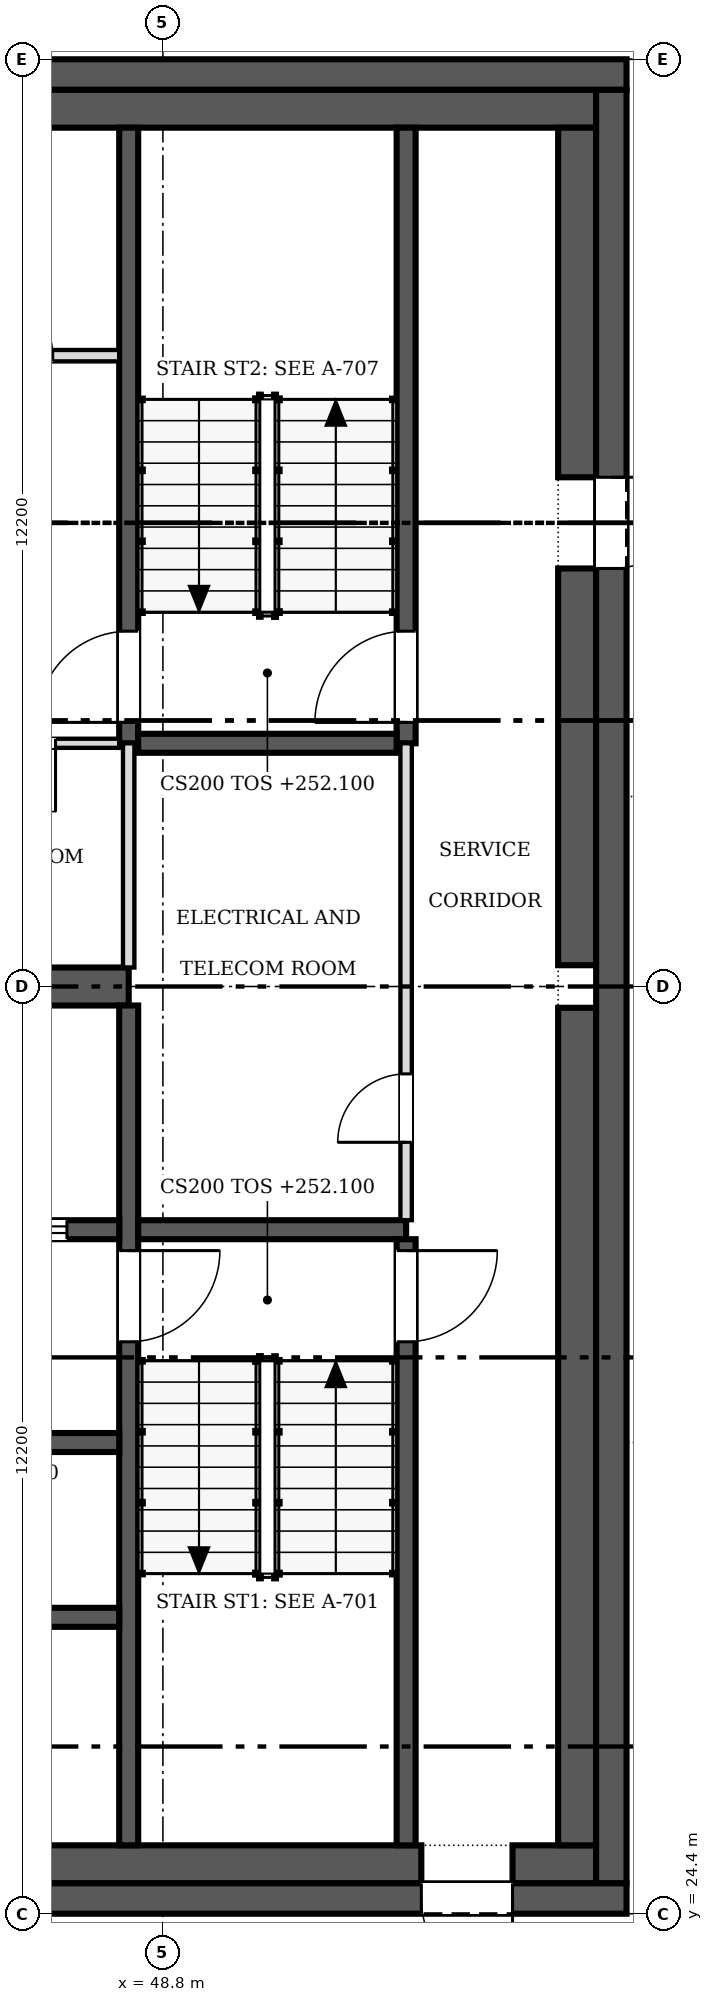
"""IFC4 building model, lengths in metres.
Left out: names, types, materials, properties, quantities, classifications, styles, units other than length and angle.
Written with IfcOpenShell. Run it as: python <this file> out.ifc"""

import sys

from ifc_helpers import new_model, si_unit, direction, frame, frame_2d, origin, place, context, subcontext, project, spatial, rectangle, extrude, source, transform, mapped, element, fill, save


model = new_model("IFC4")
c1 = context("Model", 3, precision=1e-05, world=origin(), true_north=direction((0.0, 1.0)))
c2 = subcontext(c1, "Body", "Model", "MODEL_VIEW")
j1 = project(units=[si_unit("LENGTHUNIT", "METRE"), si_unit("PLANEANGLEUNIT", "RADIAN")], contexts=[c1])
p1 = place(None, origin())
s1 = spatial("IfcSite", under=j1, at=p1, CompositionType="ELEMENT")
p2 = place(p1, origin())
s2 = spatial("IfcBuilding", under=s1, at=p2, CompositionType="ELEMENT")
p3 = place(p2, frame((0.0, 0.0, 252.1)))
s3 = spatial("IfcBuildingStorey", under=s2, at=p3, CompositionType="ELEMENT", Elevation=252.1)
p4 = place(p3, frame((54.9, 24.6, 0.0), z_axis=(0.0, 0.0, 1.0), x_axis=(-1.0, 0.0, 0.0)))
e1 = element("IfcWall", 1, at=p4, inside=s3, PredefinedType="SHEAR", context=c2, shape_type="SweptSolid", body=[
    extrude(rectangle(XDim=24.4, YDim=0.4, at=frame_2d((12.2, 0.0))), origin(), (0.0, 0.0, 1.0), 3.8),
])
m1 = source(origin(), c2, "Body", "SweptSolid", [
    extrude(rectangle(XDim=1.2, YDim=2.1, at=frame_2d((0.6, 1.05))), frame((0.0, 0.21, 0.0), z_axis=(0.0, -1.0, 0.0), x_axis=(1.0, 0.0, 0.0)), (0.0, 0.0, 1.0), 0.42),
])
p5 = place(p4, frame((1.5, 0.0, 0.0)))
e2 = element("IfcOpeningElement", 2, at=p5, cuts=e1, PredefinedType="OPENING", context=c2, shape_type="MappedRepresentation", body=[
    mapped(m1, transform((0.0, 0.0, 0.0), scale=1.0)),
])
p6 = place(p3, frame((30.5, 48.6, 0.0), z_axis=(0.0, 0.0, 1.0), x_axis=(1.0, 0.0, 0.0)))
e3 = element("IfcWall", 3, at=p6, inside=s3, PredefinedType="SHEAR", context=c2, shape_type="SweptSolid", body=[
    extrude(rectangle(XDim=24.4, YDim=0.4, at=frame_2d((12.2, 0.0))), origin(), (0.0, 0.0, 1.0), 3.8),
])
p7 = place(p3, frame((54.7, 48.4, 0.0), z_axis=(0.0, 0.0, 1.0), x_axis=(0.0, -1.0, 0.0)))
e4 = element("IfcWall", 4, at=p7, inside=s3, PredefinedType="SHEAR", context=c2, shape_type="SweptSolid", body=[
    extrude(rectangle(XDim=23.6, YDim=0.4, at=frame_2d((11.8, 0.0))), origin(), (0.0, 0.0, 1.0), 3.8),
])
p8 = place(p7, frame((5.1, 0.0, 0.0)))
e5 = element("IfcOpeningElement", 5, at=p8, cuts=e4, PredefinedType="OPENING", context=c2, shape_type="MappedRepresentation", body=[
    mapped(m1, transform((0.0, 0.0, 0.0), scale=1.0)),
])
p9 = place(p3, frame((30.9, 25.05, 0.0), z_axis=(0.0, 0.0, 1.0), x_axis=(1.0, 0.0, 0.0)))
e6 = element("IfcWall", 6, at=p9, inside=s3, PredefinedType="SOLIDWALL", context=c2, shape_type="SweptSolid", body=[
    extrude(rectangle(XDim=21.3, YDim=0.5, at=frame_2d((10.65, 0.0))), origin(), (0.0, 0.0, 1.0), 3.8),
])
p10 = place(p3, frame((53.4, 25.05, 0.0), z_axis=(0.0, 0.0, 1.0), x_axis=(1.0, 0.0, 0.0)))
e7 = element("IfcWall", 7, at=p10, inside=s3, PredefinedType="SOLIDWALL", context=c2, shape_type="SweptSolid", body=[
    extrude(rectangle(XDim=1.1, YDim=0.5, at=frame_2d((0.55, 0.0))), origin(), (0.0, 0.0, 1.0), 3.8),
])
p11 = place(p3, frame((30.9, 48.15, 0.0), z_axis=(0.0, 0.0, 1.0), x_axis=(1.0, 0.0, 0.0)))
e8 = element("IfcWall", 8, at=p11, inside=s3, PredefinedType="SOLIDWALL", context=c2, shape_type="SweptSolid", body=[
    extrude(rectangle(XDim=23.6, YDim=0.5, at=frame_2d((11.8, 0.0))), origin(), (0.0, 0.0, 1.0), 3.8),
])
p12 = place(p3, frame((54.25, 25.3, 0.0), z_axis=(0.0, 0.0, 1.0), x_axis=(0.0, 1.0, 0.0)))
e9 = element("IfcWall", 9, at=p12, inside=s3, PredefinedType="SOLIDWALL", context=c2, shape_type="SweptSolid", body=[
    extrude(rectangle(XDim=11.02, YDim=0.5, at=frame_2d((5.51, 0.0))), origin(), (0.0, 0.0, 1.0), 3.8),
])
p13 = place(p3, frame((54.25, 36.88, 0.0), z_axis=(0.0, 0.0, 1.0), x_axis=(0.0, 1.0, 0.0)))
e10 = element("IfcWall", 10, at=p13, inside=s3, PredefinedType="SOLIDWALL", context=c2, shape_type="SweptSolid", body=[
    extrude(rectangle(XDim=5.22, YDim=0.5, at=frame_2d((2.61, 0.0))), origin(), (0.0, 0.0, 1.0), 3.8),
])
p14 = place(p3, frame((54.25, 43.3, 0.0), z_axis=(0.0, 0.0, 1.0), x_axis=(0.0, 1.0, 0.0)))
e11 = element("IfcWall", 11, at=p14, inside=s3, PredefinedType="SOLIDWALL", context=c2, shape_type="SweptSolid", body=[
    extrude(rectangle(XDim=4.6, YDim=0.5, at=frame_2d((2.3, 0.0))), origin(), (0.0, 0.0, 1.0), 3.8),
])
p15 = place(p3, frame((31.4, 36.6, 0.0), z_axis=(0.0, 0.0, 1.0), x_axis=(1.0, 0.0, 0.0)))
e12 = element("IfcWall", 12, at=p15, inside=s3, PredefinedType="SHEAR", context=c2, shape_type="SweptSolid", body=[
    extrude(rectangle(XDim=16.95, YDim=0.5, at=frame_2d((8.475, 0.0))), origin(), (0.0, 0.0, 1.0), 3.8),
])
p16 = place(p3, frame((48.35, 36.35, 0.0), z_axis=(0.0, 0.0, 1.0), x_axis=(0.0, -1.0, 0.0)))
e13 = element("IfcWall", 13, at=p16, inside=s3, PredefinedType="SOLIDWALL", context=c2, shape_type="SweptSolid", body=[
    extrude(rectangle(XDim=11.05, YDim=0.25, at=frame_2d((5.525, 0.0))), origin(), (0.0, 0.0, 1.0), 3.8),
])
m2 = source(origin(), c2, "Body", "SweptSolid", [
    extrude(rectangle(XDim=1.2, YDim=2.1, at=frame_2d((0.6, 1.05))), frame((0.0, 0.135, 0.0), z_axis=(0.0, -1.0, 0.0), x_axis=(1.0, 0.0, 0.0)), (0.0, 0.0, 1.0), 0.27),
])
p17 = place(p16, frame((3.225, 0.0, 0.0)))
e14 = element("IfcOpeningElement", 14, at=p17, cuts=e13, PredefinedType="OPENING", context=c2, shape_type="MappedRepresentation", body=[
    mapped(m2, transform((0.0, 0.0, 0.0), scale=1.0)),
])
p18 = place(p3, frame((48.225, 33.4, 0.0), z_axis=(0.0, 0.0, 1.0), x_axis=(-1.0, 0.0, 0.0)))
e15 = element("IfcWall", 15, at=p18, inside=s3, PredefinedType="SOLIDWALL", context=c2, shape_type="SweptSolid", body=[
    extrude(rectangle(XDim=5.275, YDim=0.25, at=frame_2d((2.638, 0.0))), origin(), (0.0, 0.0, 1.0), 3.8),
])
p19 = place(p18, frame((3.512, 0.0, 0.0)))
e16 = element("IfcOpeningElement", 16, at=p19, cuts=e15, PredefinedType="OPENING", context=c2, shape_type="MappedRepresentation", body=[
    mapped(m2, transform((0.0, 0.0, 0.0), scale=1.0)),
])
p20 = place(p18, frame((0.688, 0.0, 0.0)))
e17 = element("IfcOpeningElement", 17, at=p20, cuts=e15, PredefinedType="OPENING", context=c2, shape_type="MappedRepresentation", body=[
    mapped(m2, transform((0.0, 0.0, 0.0), scale=1.0)),
])
p21 = place(p3, frame((48.475, 33.4, 0.0), z_axis=(0.0, 0.0, 1.0), x_axis=(1.0, 0.0, 0.0)))
e18 = element("IfcWall", 18, at=p21, inside=s3, PredefinedType="SOLIDWALL", context=c2, shape_type="SweptSolid", body=[
    extrude(rectangle(XDim=3.525, YDim=0.25, at=frame_2d((1.762, 0.0))), origin(), (0.0, 0.0, 1.0), 3.8),
])
p22 = place(p3, frame((48.35, 47.9, 0.0), z_axis=(0.0, 0.0, 1.0), x_axis=(0.0, -1.0, 0.0)))
e19 = element("IfcWall", 19, at=p22, inside=s3, PredefinedType="SOLIDWALL", context=c2, shape_type="SweptSolid", body=[
    extrude(rectangle(XDim=8.1, YDim=0.25, at=frame_2d((4.05, 0.0))), origin(), (0.0, 0.0, 1.0), 3.8),
])
p23 = place(p22, frame((6.625, 0.0, 0.0)))
e20 = element("IfcOpeningElement", 20, at=p23, cuts=e19, PredefinedType="OPENING", context=c2, shape_type="MappedRepresentation", body=[
    mapped(m2, transform((0.0, 0.0, 0.0), scale=1.0)),
])
p24 = place(p3, frame((52.0, 25.3, 0.0), z_axis=(0.0, 0.0, 1.0), x_axis=(0.0, 1.0, 0.0)))
e21 = element("IfcWall", 21, at=p24, inside=s3, PredefinedType="SOLIDWALL", context=c2, shape_type="SweptSolid", body=[
    extrude(rectangle(XDim=7.975, YDim=0.25, at=frame_2d((3.987, 0.0))), origin(), (0.0, 0.0, 1.0), 3.8),
])
p25 = place(p24, frame((6.625, 0.0, 0.0)))
e22 = element("IfcOpeningElement", 22, at=p25, cuts=e21, PredefinedType="OPENING", context=c2, shape_type="MappedRepresentation", body=[
    mapped(m2, transform((0.0, 0.0, 0.0), scale=1.0)),
])
p26 = place(p3, frame((52.0, 39.8, 0.0), z_axis=(0.0, 0.0, 1.0), x_axis=(0.0, 1.0, 0.0)))
e23 = element("IfcWall", 23, at=p26, inside=s3, PredefinedType="SOLIDWALL", context=c2, shape_type="SweptSolid", body=[
    extrude(rectangle(XDim=8.1, YDim=0.25, at=frame_2d((4.05, 0.0))), origin(), (0.0, 0.0, 1.0), 3.8),
])
p27 = place(p26, frame((0.275, 0.0, 0.0)))
e24 = element("IfcOpeningElement", 24, at=p27, cuts=e23, PredefinedType="OPENING", context=c2, shape_type="MappedRepresentation", body=[
    mapped(m2, transform((0.0, 0.0, 0.0), scale=1.0)),
])
for number, where, z_axis, x_axis in (
    (25, (42.95, 28.3, 0.0), (0.0, 0.0, 1.0), (1.0, 0.0, 0.0)),
    (26, (42.95, 30.6, 0.0), (0.0, 0.0, 1.0), (1.0, 0.0, 0.0)),
):
    element("IfcWall", number, at=place(p3, frame(where, z_axis=z_axis, x_axis=x_axis)), inside=s3, PredefinedType="SOLIDWALL", context=c2, shape_type="SweptSolid", body=[
        extrude(rectangle(XDim=5.275, YDim=0.25, at=frame_2d((2.638, 0.0))), origin(), (0.0, 0.0, 1.0), 3.8),
    ])
p28 = place(p3, frame((48.475, 39.8, 0.0), z_axis=(0.0, 0.0, 1.0), x_axis=(1.0, 0.0, 0.0)))
e27 = element("IfcWall", 27, at=p28, inside=s3, PredefinedType="SOLIDWALL", context=c2, shape_type="SweptSolid", body=[
    extrude(rectangle(XDim=3.4, YDim=0.25, at=frame_2d((1.7, 0.0))), origin(), (0.0, 0.0, 1.0), 3.8),
])
p29 = place(p3, frame((52.0, 33.525, 0.0), z_axis=(0.0, 0.0, 1.0), x_axis=(0.0, 1.0, 0.0)))
e28 = element("IfcWall", 28, at=p29, inside=s3, PredefinedType="PARTITIONING", context=c2, shape_type="SweptSolid", body=[
    extrude(rectangle(XDim=6.275, YDim=0.15, at=frame_2d((3.138, 0.0))), origin(), (0.0, 0.0, 1.0), 3.6),
])
m3 = source(origin(), c2, "Body", "SweptSolid", [
    extrude(rectangle(XDim=0.9, YDim=2.1, at=frame_2d((0.45, 1.05))), frame((0.0, 0.085, 0.0), z_axis=(0.0, -1.0, 0.0), x_axis=(1.0, 0.0, 0.0)), (0.0, 0.0, 1.0), 0.17),
])
p30 = place(p29, frame((1.025, 0.0, 0.0)))
e29 = element("IfcOpeningElement", 29, at=p30, cuts=e28, PredefinedType="OPENING", context=c2, shape_type="MappedRepresentation", body=[
    mapped(m3, transform((0.0, 0.0, 0.0), scale=1.0)),
])
p31 = place(p3, frame((48.225, 39.8, 0.0), z_axis=(0.0, 0.0, 1.0), x_axis=(-1.0, 0.0, 0.0)))
e30 = element("IfcWall", 30, at=p31, inside=s3, PredefinedType="PARTITIONING", context=c2, shape_type="SweptSolid", body=[
    extrude(rectangle(XDim=5.275, YDim=0.12, at=frame_2d((2.638, 0.0))), origin(), (0.0, 0.0, 1.0), 3.6),
])
m4 = source(origin(), c2, "Body", "SweptSolid", [
    extrude(rectangle(XDim=0.9, YDim=2.1, at=frame_2d((0.45, 1.05))), frame((0.0, 0.07, 0.0), z_axis=(0.0, -1.0, 0.0), x_axis=(1.0, 0.0, 0.0)), (0.0, 0.0, 1.0), 0.14),
])
p32 = place(p31, frame((3.663, 0.0, 0.0)))
e31 = element("IfcOpeningElement", 31, at=p32, cuts=e30, PredefinedType="OPENING", context=c2, shape_type="MappedRepresentation", body=[
    mapped(m4, transform((0.0, 0.0, 0.0), scale=1.0)),
])
p33 = place(p31, frame((0.837, 0.0, 0.0)))
e32 = element("IfcOpeningElement", 32, at=p33, cuts=e30, PredefinedType="OPENING", context=c2, shape_type="MappedRepresentation", body=[
    mapped(m4, transform((0.0, 0.0, 0.0), scale=1.0)),
])
p34 = place(p3, frame((48.35, 36.85, 0.0), z_axis=(0.0, 0.0, 1.0), x_axis=(0.0, 1.0, 0.0)))
e33 = element("IfcWall", 33, at=p34, inside=s3, PredefinedType="PARTITIONING", context=c2, shape_type="SweptSolid", body=[
    extrude(rectangle(XDim=2.95, YDim=0.15, at=frame_2d((1.475, 0.0))), origin(), (0.0, 0.0, 1.0), 3.6),
])
p35 = place(p3, frame((45.6, 44.9, 0.0), z_axis=(0.0, 0.0, 1.0), x_axis=(1.0, 0.0, 0.0)))
e34 = element("IfcWall", 34, at=p35, inside=s3, PredefinedType="PARTITIONING", context=c2, shape_type="SweptSolid", body=[
    extrude(rectangle(XDim=2.625, YDim=0.15, at=frame_2d((1.312, 0.0))), origin(), (0.0, 0.0, 1.0), 3.6),
])
p36 = place(p35, frame((0.85, 0.0, 0.0)))
e35 = element("IfcOpeningElement", 35, at=p36, cuts=e34, PredefinedType="OPENING", context=c2, shape_type="MappedRepresentation", body=[
    mapped(m3, transform((0.0, 0.0, 0.0), scale=1.0)),
])
m5 = source(origin(), c2, "Body", "SweptSolid", [
    extrude(rectangle(XDim=1.2, YDim=2.1, at=frame_2d((0.6, 1.05))), frame((0.0, 0.025, 0.0), z_axis=(0.0, -1.0, 0.0), x_axis=(1.0, 0.0, 0.0)), (0.0, 0.0, 1.0), 0.05),
])
p37 = place(p5, origin())
e36 = element("IfcDoor", 36, at=p37, inside=s3, OperationType="SINGLE_SWING_LEFT", PredefinedType="DOOR", context=c2, shape_type="MappedRepresentation", body=[
    mapped(m5, transform((0.0, 0.0, 0.0), scale=1.0)),
])
fill(e2, e36)
p38 = place(p8, origin())
e37 = element("IfcDoor", 37, at=p38, inside=s3, OperationType="SINGLE_SWING_LEFT", PredefinedType="DOOR", context=c2, shape_type="MappedRepresentation", body=[
    mapped(m5, transform((0.0, 0.0, 0.0), scale=1.0)),
])
fill(e5, e37)
p39 = place(p17, origin())
e38 = element("IfcDoor", 38, at=p39, inside=s3, OperationType="SINGLE_SWING_LEFT", PredefinedType="DOOR", context=c2, shape_type="MappedRepresentation", body=[
    mapped(m5, transform((0.0, 0.0, 0.0), scale=1.0)),
])
fill(e14, e38)
p40 = place(p20, origin())
e39 = element("IfcDoor", 39, at=p40, inside=s3, OperationType="DOUBLE_DOOR_SLIDING", PredefinedType="DOOR", context=c2, shape_type="MappedRepresentation", body=[
    mapped(m5, transform((0.0, 0.0, 0.0), scale=1.0)),
])
fill(e17, e39)
p41 = place(p23, origin())
e40 = element("IfcDoor", 40, at=p41, inside=s3, OperationType="SINGLE_SWING_RIGHT", PredefinedType="DOOR", context=c2, shape_type="MappedRepresentation", body=[
    mapped(m5, transform((0.0, 0.0, 0.0), scale=1.0)),
])
fill(e20, e40)
p42 = place(p25, origin())
e41 = element("IfcDoor", 41, at=p42, inside=s3, OperationType="SINGLE_SWING_RIGHT", PredefinedType="DOOR", context=c2, shape_type="MappedRepresentation", body=[
    mapped(m5, transform((0.0, 0.0, 0.0), scale=1.0)),
])
fill(e22, e41)
p43 = place(p27, origin())
e42 = element("IfcDoor", 42, at=p43, inside=s3, OperationType="SINGLE_SWING_LEFT", PredefinedType="DOOR", context=c2, shape_type="MappedRepresentation", body=[
    mapped(m5, transform((0.0, 0.0, 0.0), scale=1.0)),
])
fill(e24, e42)
m6 = source(origin(), c2, "Body", "SweptSolid", [
    extrude(rectangle(XDim=0.9, YDim=2.1, at=frame_2d((0.45, 1.05))), frame((0.0, 0.025, 0.0), z_axis=(0.0, -1.0, 0.0), x_axis=(1.0, 0.0, 0.0)), (0.0, 0.0, 1.0), 0.05),
])
p44 = place(p30, origin())
e43 = element("IfcDoor", 43, at=p44, inside=s3, OperationType="SINGLE_SWING_LEFT", PredefinedType="DOOR", context=c2, shape_type="MappedRepresentation", body=[
    mapped(m6, transform((0.0, 0.0, 0.0), scale=1.0)),
])
fill(e29, e43)
p45 = place(p33, origin())
e44 = element("IfcDoor", 44, at=p45, inside=s3, OperationType="SINGLE_SWING_LEFT", PredefinedType="DOOR", context=c2, shape_type="MappedRepresentation", body=[
    mapped(m6, transform((0.0, 0.0, 0.0), scale=1.0)),
])
fill(e32, e44)
save(model, sys.argv[1])
